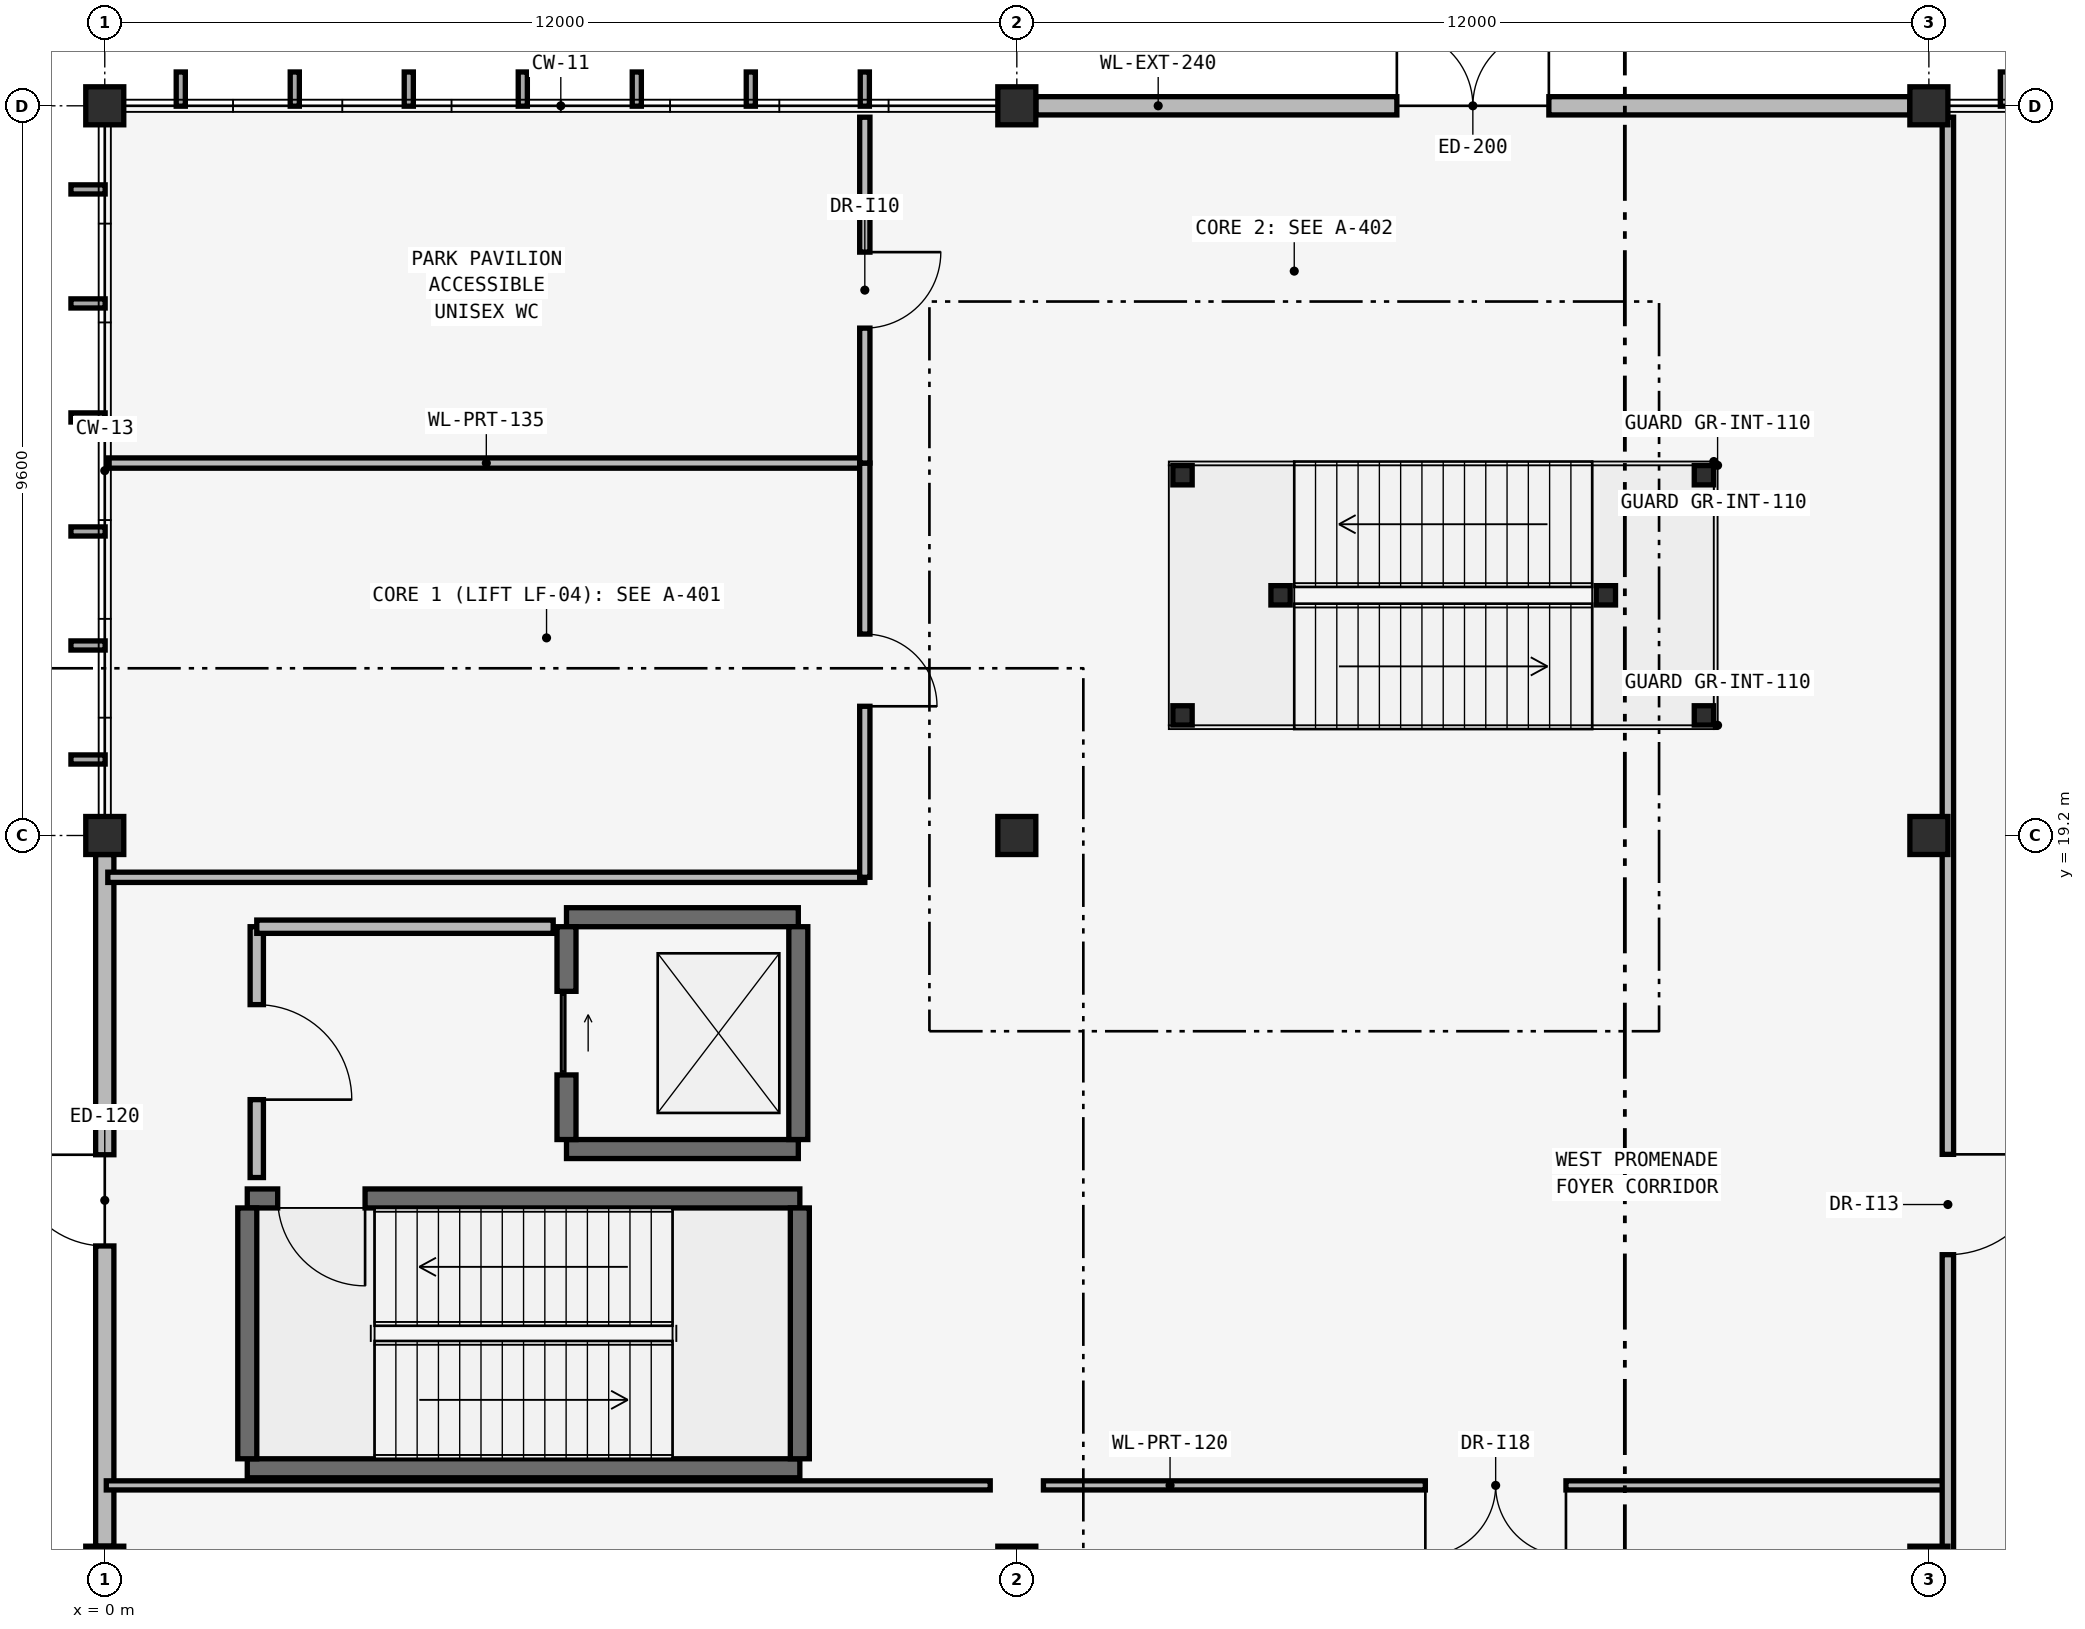
"""IFC4 building model, lengths in metres.
Left out: names, types, materials, properties, quantities, classifications, styles, units other than length and angle.
Written with IfcOpenShell. Run it as: python <this file> out.ifc"""

import sys

from ifc_helpers import new_model, si_unit, direction, frame, frame_2d, origin, origin_2d, place, context, subcontext, project, spatial, rectangle, i_section, extrude, element, fill, save


model = new_model("IFC4")
c1 = context("Model", 3, precision=1e-05, world=origin(), true_north=direction((0.0, 1.0)))
c2 = subcontext(c1, "Body", "Model", "MODEL_VIEW")
j1 = project(units=[si_unit("LENGTHUNIT", "METRE"), si_unit("PLANEANGLEUNIT", "RADIAN")], contexts=[c1])
p1 = place(None, origin())
s1 = spatial("IfcSite", under=j1, at=p1, CompositionType="ELEMENT")
p2 = place(p1, origin())
s2 = spatial("IfcBuilding", under=s1, at=p2, CompositionType="ELEMENT")
p3 = place(p2, origin())
s3 = spatial("IfcBuildingStorey", under=s2, at=p3, CompositionType="ELEMENT", Elevation=0.0)
for number, where, z_axis, x_axis in (
    (1, (0.0, 9.6, -0.27), (0.0, 0.0, 1.0), (1.0, 0.0, 0.0)),
    (2, (12.0, 9.6, -0.27), (0.0, 0.0, 1.0), (1.0, 0.0, 0.0)),
    (3, (24.0, 9.6, -0.27), (0.0, 0.0, 1.0), (1.0, 0.0, 0.0)),
    (4, (0.0, 19.2, -0.27), (0.0, 0.0, 1.0), (1.0, 0.0, 0.0)),
    (5, (12.0, 19.2, -0.27), (0.0, 0.0, 1.0), (1.0, 0.0, 0.0)),
    (6, (24.0, 19.2, -0.27), (0.0, 0.0, 1.0), (1.0, 0.0, 0.0)),
    (7, (0.0, 28.8, -0.27), (0.0, 0.0, 1.0), (1.0, 0.0, 0.0)),
    (8, (12.0, 28.8, -0.27), (0.0, 0.0, 1.0), (1.0, 0.0, 0.0)),
    (9, (24.0, 28.8, -0.27), (0.0, 0.0, 1.0), (1.0, 0.0, 0.0)),
):
    element("IfcColumn", number, at=place(p3, frame(where, z_axis=z_axis, x_axis=x_axis)), inside=s3, PredefinedType="COLUMN", context=c2, shape_type="SweptSolid", body=[
        extrude(rectangle(XDim=0.5, YDim=0.5, at=origin_2d()), origin(), (0.0, 0.0, 1.0), 5.67),
    ])
for number, where, z_axis, x_axis in (
    (10, (21.04, 20.78, -0.27), (0.0, 0.0, 1.0), (1.0, 0.0, 0.0)),
    (11, (21.04, 23.94, -0.27), (0.0, 0.0, 1.0), (1.0, 0.0, 0.0)),
    (12, (19.75, 22.36, -0.27), (0.0, 0.0, 1.0), (1.0, 0.0, 0.0)),
):
    element("IfcColumn", number, at=place(p3, frame(where, z_axis=z_axis, x_axis=x_axis)), inside=s3, PredefinedType="COLUMN", context=c2, shape_type="SweptSolid", body=[
        extrude(i_section(OverallWidth=0.254, OverallDepth=0.254, WebThickness=0.009, FlangeThickness=0.014, at=origin_2d()), origin(), (0.0, 0.0, 1.0), 2.77),
    ])
for number, where, z_axis, x_axis in (
    (13, (14.18, 20.78, -0.27), (0.0, 0.0, 1.0), (1.0, 0.0, 0.0)),
    (14, (14.18, 23.94, -0.27), (0.0, 0.0, 1.0), (1.0, 0.0, 0.0)),
    (15, (15.47, 22.36, -0.27), (0.0, 0.0, 1.0), (1.0, 0.0, 0.0)),
):
    element("IfcColumn", number, at=place(p3, frame(where, z_axis=z_axis, x_axis=x_axis)), inside=s3, PredefinedType="COLUMN", context=c2, shape_type="SweptSolid", body=[
        extrude(i_section(OverallWidth=0.254, OverallDepth=0.254, WebThickness=0.009, FlangeThickness=0.014, at=origin_2d()), origin(), (0.0, 0.0, 1.0), 5.47),
    ])
p4 = place(p3, frame((12.25, 28.8, 0.0), z_axis=(0.0, 0.0, 1.0), x_axis=(1.0, 0.0, 0.0)))
e16 = element("IfcWall", 16, at=p4, inside=s3, PredefinedType="SOLIDWALL", context=c2, shape_type="SweptSolid", body=[
    extrude(rectangle(XDim=11.5, YDim=0.24, at=frame_2d((5.75, 0.0))), origin(), (0.0, 0.0, 1.0), 4.456),
])
p5 = place(p4, frame((4.75, 0.0, 0.0)))
e17 = element("IfcOpeningElement", 17, at=p5, cuts=e16, PredefinedType="OPENING", context=c2, shape_type="SweptSolid", body=[
    extrude(rectangle(XDim=2.0, YDim=2.3, at=frame_2d((1.0, 1.15))), frame((0.0, 0.135, 0.0), z_axis=(0.0, -1.0, 0.0), x_axis=(1.0, 0.0, 0.0)), (0.0, 0.0, 1.0), 0.27),
])
p6 = place(p3, frame((0.0, 9.85, 0.0), z_axis=(0.0, 0.0, 1.0), x_axis=(0.0, 1.0, 0.0)))
e18 = element("IfcWall", 18, at=p6, inside=s3, PredefinedType="SOLIDWALL", context=c2, shape_type="SweptSolid", body=[
    extrude(rectangle(XDim=9.1, YDim=0.24, at=frame_2d((4.55, 0.0))), origin(), (0.0, 0.0, 1.0), 4.456),
])
p7 = place(p6, frame((3.95, 0.0, 0.0)))
e19 = element("IfcOpeningElement", 19, at=p7, cuts=e18, PredefinedType="OPENING", context=c2, shape_type="SweptSolid", body=[
    extrude(rectangle(XDim=1.2, YDim=2.2, at=frame_2d((0.6, 1.1))), frame((0.0, 0.135, 0.0), z_axis=(0.0, -1.0, 0.0), x_axis=(1.0, 0.0, 0.0)), (0.0, 0.0, 1.0), 0.27),
])
p8 = place(p3, frame((1.875, 10.875, 0.0), z_axis=(0.0, 0.0, 1.0), x_axis=(1.0, 0.0, 0.0)))
e20 = element("IfcWall", 20, at=p8, inside=s3, PredefinedType="SHEAR", context=c2, shape_type="SweptSolid", body=[
    extrude(rectangle(XDim=7.27, YDim=0.25, at=frame_2d((3.635, 0.0))), origin(), (0.0, 0.0, 1.0), 5.08),
])
p9 = place(p3, frame((1.875, 14.425, 0.0), z_axis=(0.0, 0.0, 1.0), x_axis=(1.0, 0.0, 0.0)))
e21 = element("IfcWall", 21, at=p9, inside=s3, PredefinedType="SHEAR", context=c2, shape_type="SweptSolid", body=[
    extrude(rectangle(XDim=7.27, YDim=0.25, at=frame_2d((3.635, 0.0))), origin(), (0.0, 0.0, 1.0), 5.08),
])
p10 = place(p9, frame((0.4, 0.0, 0.0)))
e22 = element("IfcOpeningElement", 22, at=p10, cuts=e21, PredefinedType="OPENING", context=c2, shape_type="SweptSolid", body=[
    extrude(rectangle(XDim=1.15, YDim=2.15, at=frame_2d((0.575, 1.075))), frame((0.0, 0.14, 0.0), z_axis=(0.0, -1.0, 0.0), x_axis=(1.0, 0.0, 0.0)), (0.0, 0.0, 1.0), 0.28),
])
for number, where, z_axis, x_axis in (
    (23, (1.875, 11.0, 0.0), (0.0, 0.0, 1.0), (0.0, 1.0, 0.0)),
    (24, (9.145, 11.0, 0.0), (0.0, 0.0, 1.0), (0.0, 1.0, 0.0)),
):
    element("IfcWall", number, at=place(p3, frame(where, z_axis=z_axis, x_axis=x_axis)), inside=s3, PredefinedType="SHEAR", context=c2, shape_type="SweptSolid", body=[
        extrude(rectangle(XDim=3.3, YDim=0.25, at=frame_2d((1.65, 0.0))), origin(), (0.0, 0.0, 1.0), 5.08),
    ])
for number, where, z_axis, x_axis in (
    (25, (6.075, 15.075, 0.0), (0.0, 0.0, 1.0), (1.0, 0.0, 0.0)),
    (26, (6.075, 18.125, 0.0), (0.0, 0.0, 1.0), (1.0, 0.0, 0.0)),
):
    element("IfcWall", number, at=place(p3, frame(where, z_axis=z_axis, x_axis=x_axis)), inside=s3, PredefinedType="SHEAR", context=c2, shape_type="SweptSolid", body=[
        extrude(rectangle(XDim=3.05, YDim=0.25, at=frame_2d((1.525, 0.0))), origin(), (0.0, 0.0, 1.0), 5.08),
    ])
p11 = place(p3, frame((9.125, 15.2, 0.0), z_axis=(0.0, 0.0, 1.0), x_axis=(0.0, 1.0, 0.0)))
e27 = element("IfcWall", 27, at=p11, inside=s3, PredefinedType="SHEAR", context=c2, shape_type="SweptSolid", body=[
    extrude(rectangle(XDim=2.8, YDim=0.25, at=frame_2d((1.4, 0.0))), origin(), (0.0, 0.0, 1.0), 5.08),
])
p12 = place(p3, frame((6.075, 15.2, 0.0), z_axis=(0.0, 0.0, 1.0), x_axis=(0.0, 1.0, 0.0)))
e28 = element("IfcWall", 28, at=p12, inside=s3, PredefinedType="SHEAR", context=c2, shape_type="SweptSolid", body=[
    extrude(rectangle(XDim=2.8, YDim=0.25, at=frame_2d((1.4, 0.0))), origin(), (0.0, 0.0, 1.0), 5.08),
])
p13 = place(p12, frame((0.85, 0.0, 0.0)))
e29 = element("IfcOpeningElement", 29, at=p13, cuts=e28, PredefinedType="OPENING", context=c2, shape_type="SweptSolid", body=[
    extrude(rectangle(XDim=1.1, YDim=2.15, at=frame_2d((0.55, 1.075))), frame((0.0, 0.14, 0.0), z_axis=(0.0, -1.0, 0.0), x_axis=(1.0, 0.0, 0.0)), (0.0, 0.0, 1.0), 0.28),
])
p14 = place(p3, frame((2.0, 14.7, 0.0), z_axis=(0.0, 0.0, 1.0), x_axis=(0.0, 1.0, 0.0)))
e30 = element("IfcWall", 30, at=p14, inside=s3, PredefinedType="PARTITIONING", context=c2, shape_type="SweptSolid", body=[
    extrude(rectangle(XDim=3.3, YDim=0.175, at=frame_2d((1.65, 0.0))), origin(), (0.0, 0.0, 1.0), 5.08),
])
p15 = place(p14, frame((1.025, 0.0, 0.0)))
e31 = element("IfcOpeningElement", 31, at=p15, cuts=e30, PredefinedType="OPENING", context=c2, shape_type="SweptSolid", body=[
    extrude(rectangle(XDim=1.25, YDim=2.2, at=frame_2d((0.625, 1.1))), frame((0.0, 0.103, 0.0), z_axis=(0.0, -1.0, 0.0), x_axis=(1.0, 0.0, 0.0)), (0.0, 0.0, 1.0), 0.205),
])
p16 = place(p3, frame((2.0, 18.0, 0.0), z_axis=(0.0, 0.0, 1.0), x_axis=(1.0, 0.0, 0.0)))
e32 = element("IfcWall", 32, at=p16, inside=s3, PredefinedType="PARTITIONING", context=c2, shape_type="SweptSolid", body=[
    extrude(rectangle(XDim=3.9, YDim=0.175, at=frame_2d((1.95, 0.0))), origin(), (0.0, 0.0, 1.0), 5.08),
])
p17 = place(p3, frame((0.02, 10.65, 0.0), z_axis=(0.0, 0.0, 1.0), x_axis=(1.0, 0.0, 0.0)))
e33 = element("IfcWall", 33, at=p17, inside=s3, PredefinedType="PARTITIONING", context=c2, shape_type="SweptSolid", body=[
    extrude(rectangle(XDim=11.63, YDim=0.12, at=frame_2d((5.815, 0.0))), origin(), (0.0, 0.0, 1.0), 5.08),
])
p18 = place(p3, frame((12.35, 10.65, 0.0), z_axis=(0.0, 0.0, 1.0), x_axis=(1.0, 0.0, 0.0)))
e34 = element("IfcWall", 34, at=p18, inside=s3, PredefinedType="PARTITIONING", context=c2, shape_type="SweptSolid", body=[
    extrude(rectangle(XDim=11.9, YDim=0.12, at=frame_2d((5.95, 0.0))), origin(), (0.0, 0.0, 1.0), 5.08),
])
p19 = place(p18, frame((5.025, 0.0, 0.0)))
e35 = element("IfcOpeningElement", 35, at=p19, cuts=e34, PredefinedType="OPENING", context=c2, shape_type="SweptSolid", body=[
    extrude(rectangle(XDim=1.85, YDim=2.2, at=frame_2d((0.925, 1.1))), frame((0.0, 0.075, 0.0), z_axis=(0.0, -1.0, 0.0), x_axis=(1.0, 0.0, 0.0)), (0.0, 0.0, 1.0), 0.15),
])
p20 = place(p3, frame((24.25, 0.04, 0.0), z_axis=(0.0, 0.0, 1.0), x_axis=(0.0, 1.0, 0.0)))
e36 = element("IfcWall", 36, at=p20, inside=s3, PredefinedType="PARTITIONING", context=c2, shape_type="SweptSolid", body=[
    extrude(rectangle(XDim=28.61, YDim=0.15, at=frame_2d((14.305, 0.0))), origin(), (0.0, 0.0, 1.0), 5.08),
])
p21 = place(p20, frame((13.645, 0.0, 0.0)))
e37 = element("IfcOpeningElement", 37, at=p21, cuts=e36, PredefinedType="OPENING", context=c2, shape_type="SweptSolid", body=[
    extrude(rectangle(XDim=1.32, YDim=2.15, at=frame_2d((0.66, 1.075))), frame((0.0, 0.09, 0.0), z_axis=(0.0, -1.0, 0.0), x_axis=(1.0, 0.0, 0.0)), (0.0, 0.0, 1.0), 0.18),
])
for number, where, z_axis, x_axis in (
    (38, (0.04, 18.65, 0.0), (0.0, 0.0, 1.0), (1.0, 0.0, 0.0)),
    (39, (0.04, 24.1, 0.0), (0.0, 0.0, 1.0), (1.0, 0.0, 0.0)),
):
    element("IfcWall", number, at=place(p3, frame(where, z_axis=z_axis, x_axis=x_axis)), inside=s3, PredefinedType="PARTITIONING", context=c2, shape_type="SweptSolid", body=[
        extrude(rectangle(XDim=9.96, YDim=0.135, at=frame_2d((4.98, 0.0))), origin(), (0.0, 0.0, 1.0), 5.08),
    ])
p22 = place(p3, frame((10.0, 18.65, 0.0), z_axis=(0.0, 0.0, 1.0), x_axis=(0.0, 1.0, 0.0)))
e40 = element("IfcWall", 40, at=p22, inside=s3, PredefinedType="PARTITIONING", context=c2, shape_type="SweptSolid", body=[
    extrude(rectangle(XDim=5.45, YDim=0.135, at=frame_2d((2.725, 0.0))), origin(), (0.0, 0.0, 1.0), 5.08),
])
p23 = place(p22, frame((2.25, 0.0, 0.0)))
e41 = element("IfcOpeningElement", 41, at=p23, cuts=e40, PredefinedType="OPENING", context=c2, shape_type="SweptSolid", body=[
    extrude(rectangle(XDim=0.95, YDim=2.1, at=frame_2d((0.475, 1.05))), frame((0.0, 0.083, 0.0), z_axis=(0.0, -1.0, 0.0), x_axis=(1.0, 0.0, 0.0)), (0.0, 0.0, 1.0), 0.165),
])
p24 = place(p3, frame((10.0, 24.1, 0.0), z_axis=(0.0, 0.0, 1.0), x_axis=(0.0, 1.0, 0.0)))
e42 = element("IfcWall", 42, at=p24, inside=s3, PredefinedType="PARTITIONING", context=c2, shape_type="SweptSolid", body=[
    extrude(rectangle(XDim=4.55, YDim=0.135, at=frame_2d((2.275, 0.0))), origin(), (0.0, 0.0, 1.0), 5.08),
])
p25 = place(p24, frame((1.775, 0.0, 0.0)))
e43 = element("IfcOpeningElement", 43, at=p25, cuts=e42, PredefinedType="OPENING", context=c2, shape_type="SweptSolid", body=[
    extrude(rectangle(XDim=1.0, YDim=2.1, at=frame_2d((0.5, 1.05))), frame((0.0, 0.083, 0.0), z_axis=(0.0, -1.0, 0.0), x_axis=(1.0, 0.0, 0.0)), (0.0, 0.0, 1.0), 0.165),
])
p26 = place(p5, origin())
e44 = element("IfcDoor", 44, at=p26, inside=s3, OperationType="DOUBLE_DOOR_SINGLE_SWING", PredefinedType="DOOR", context=c2, shape_type="SweptSolid", body=[
    extrude(rectangle(XDim=2.0, YDim=2.3, at=frame_2d((1.0, 1.15))), frame((0.0, 0.025, 0.0), z_axis=(0.0, -1.0, 0.0), x_axis=(1.0, 0.0, 0.0)), (0.0, 0.0, 1.0), 0.05),
])
fill(e17, e44)
p27 = place(p7, origin())
e45 = element("IfcDoor", 45, at=p27, inside=s3, OperationType="SINGLE_SWING_RIGHT", PredefinedType="DOOR", context=c2, shape_type="SweptSolid", body=[
    extrude(rectangle(XDim=1.2, YDim=2.2, at=frame_2d((0.6, 1.1))), frame((0.0, 0.025, 0.0), z_axis=(0.0, -1.0, 0.0), x_axis=(1.0, 0.0, 0.0)), (0.0, 0.0, 1.0), 0.05),
])
fill(e19, e45)
p28 = place(p10, origin())
e46 = element("IfcDoor", 46, at=p28, inside=s3, OperationType="SINGLE_SWING_RIGHT", PredefinedType="DOOR", context=c2, shape_type="SweptSolid", body=[
    extrude(rectangle(XDim=1.15, YDim=2.15, at=frame_2d((0.575, 1.075))), frame((0.0, 0.025, 0.0), z_axis=(0.0, -1.0, 0.0), x_axis=(1.0, 0.0, 0.0)), (0.0, 0.0, 1.0), 0.05),
])
fill(e22, e46)
p29 = place(p13, origin())
e47 = element("IfcDoor", 47, at=p29, inside=s3, OperationType="SLIDING_TO_LEFT", PredefinedType="DOOR", context=c2, shape_type="SweptSolid", body=[
    extrude(rectangle(XDim=1.1, YDim=2.15, at=frame_2d((0.55, 1.075))), frame((0.0, 0.025, 0.0), z_axis=(0.0, -1.0, 0.0), x_axis=(1.0, 0.0, 0.0)), (0.0, 0.0, 1.0), 0.05),
])
fill(e29, e47)
p30 = place(p15, frame((1.25, 0.0, 0.0), z_axis=(0.0, 0.0, 1.0), x_axis=(-1.0, 0.0, 0.0)))
e48 = element("IfcDoor", 48, at=p30, inside=s3, OperationType="SINGLE_SWING_LEFT", PredefinedType="DOOR", context=c2, shape_type="SweptSolid", body=[
    extrude(rectangle(XDim=1.25, YDim=2.2, at=frame_2d((0.625, 1.1))), frame((0.0, 0.025, 0.0), z_axis=(0.0, -1.0, 0.0), x_axis=(1.0, 0.0, 0.0)), (0.0, 0.0, 1.0), 0.05),
])
fill(e31, e48)
p31 = place(p19, origin())
e49 = element("IfcDoor", 49, at=p31, inside=s3, OperationType="DOUBLE_DOOR_SINGLE_SWING", PredefinedType="DOOR", context=c2, shape_type="SweptSolid", body=[
    extrude(rectangle(XDim=1.85, YDim=2.2, at=frame_2d((0.925, 1.1))), frame((0.0, 0.025, 0.0), z_axis=(0.0, -1.0, 0.0), x_axis=(1.0, 0.0, 0.0)), (0.0, 0.0, 1.0), 0.05),
])
fill(e35, e49)
p32 = place(p21, origin())
e50 = element("IfcDoor", 50, at=p32, inside=s3, OperationType="SINGLE_SWING_RIGHT", PredefinedType="DOOR", context=c2, shape_type="SweptSolid", body=[
    extrude(rectangle(XDim=1.32, YDim=2.15, at=frame_2d((0.66, 1.075))), frame((0.0, 0.025, 0.0), z_axis=(0.0, -1.0, 0.0), x_axis=(1.0, 0.0, 0.0)), (0.0, 0.0, 1.0), 0.05),
])
fill(e37, e50)
p33 = place(p23, origin())
e51 = element("IfcDoor", 51, at=p33, inside=s3, OperationType="SINGLE_SWING_LEFT", PredefinedType="DOOR", context=c2, shape_type="SweptSolid", body=[
    extrude(rectangle(XDim=0.95, YDim=2.1, at=frame_2d((0.475, 1.05))), frame((0.0, 0.025, 0.0), z_axis=(0.0, -1.0, 0.0), x_axis=(1.0, 0.0, 0.0)), (0.0, 0.0, 1.0), 0.05),
])
fill(e41, e51)
p34 = place(p25, origin())
e52 = element("IfcDoor", 52, at=p34, inside=s3, OperationType="SINGLE_SWING_RIGHT", PredefinedType="DOOR", context=c2, shape_type="SweptSolid", body=[
    extrude(rectangle(XDim=1.0, YDim=2.1, at=frame_2d((0.5, 1.05))), frame((0.0, 0.025, 0.0), z_axis=(0.0, -1.0, 0.0), x_axis=(1.0, 0.0, 0.0)), (0.0, 0.0, 1.0), 0.05),
])
fill(e43, e52)
save(model, sys.argv[1])
